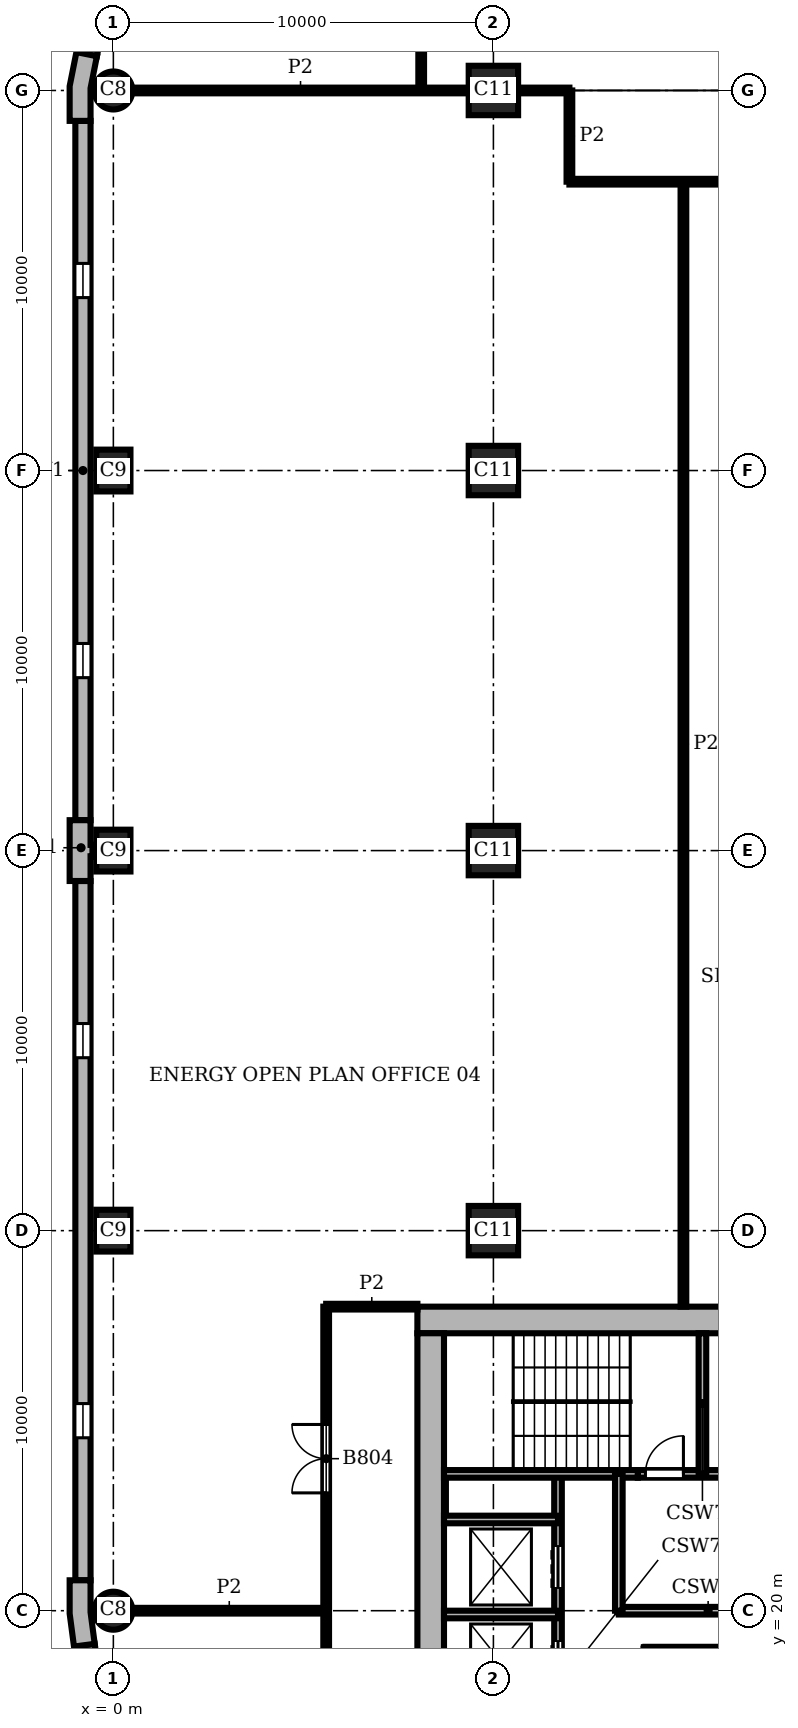
"""IFC4 building model, lengths in metres.
Left out: names, types, materials, properties, quantities, classifications, styles, units other than length and angle.
Written with IfcOpenShell. Run it as: python <this file> out.ifc"""

import sys

from ifc_helpers import new_model, si_unit, direction, frame, frame_2d, origin, origin_2d, place, context, subcontext, project, spatial, polyline, rectangle, circle, outline, extrude, element, fill, save


model = new_model("IFC4")
c1 = context("Model", 3, precision=1e-05, world=origin(), true_north=direction((0.0, 1.0)))
c2 = subcontext(c1, "Body", "Model", "MODEL_VIEW")
j1 = project(units=[si_unit("LENGTHUNIT", "METRE"), si_unit("PLANEANGLEUNIT", "RADIAN")], contexts=[c1])
p1 = place(None, origin())
s1 = spatial("IfcSite", under=j1, at=p1, CompositionType="ELEMENT")
p2 = place(p1, origin())
s2 = spatial("IfcBuilding", under=s1, at=p2, CompositionType="ELEMENT")
p3 = place(p2, frame((0.0, 0.0, 213.6)))
s3 = spatial("IfcBuildingStorey", under=s2, at=p3, CompositionType="ELEMENT", Elevation=213.6)
p4 = place(p3, frame((0.0, 60.0, 0.0), z_axis=(0.0, 0.0, 1.0), x_axis=(1.0, 0.0, 0.0)))
e1 = element("IfcColumn", 1, at=p4, inside=s3, PredefinedType="COLUMN", context=c2, shape_type="SweptSolid", body=[
    extrude(circle(Radius=0.5, at=origin_2d()), origin(), (0.0, 0.0, 1.0), 3.9),
])
for number, where, z_axis, x_axis in (
    (2, (0.0, 50.0, 0.0), (0.0, 0.0, 1.0), (0.0, 1.0, 0.0)),
    (3, (0.0, 40.0, 0.0), (0.0, 0.0, 1.0), (0.0, 1.0, 0.0)),
    (4, (0.0, 30.0, 0.0), (0.0, 0.0, 1.0), (0.0, 1.0, 0.0)),
):
    element("IfcColumn", number, at=place(p3, frame(where, z_axis=z_axis, x_axis=x_axis)), inside=s3, PredefinedType="COLUMN", context=c2, shape_type="SweptSolid", body=[
        extrude(rectangle(XDim=1.1, YDim=0.9, at=origin_2d()), origin(), (0.0, 0.0, 1.0), 3.9),
    ])
p5 = place(p3, frame((0.0, 20.0, 0.0), z_axis=(0.0, 0.0, 1.0), x_axis=(1.0, 0.0, 0.0)))
e5 = element("IfcColumn", 5, at=p5, inside=s3, PredefinedType="COLUMN", context=c2, shape_type="SweptSolid", body=[
    extrude(circle(Radius=0.5, at=origin_2d()), origin(), (0.0, 0.0, 1.0), 3.9),
])
for number, where, z_axis, x_axis in (
    (6, (10.0, 30.0, 0.0), (0.0, 0.0, 1.0), (1.0, 0.0, 0.0)),
    (7, (10.0, 40.0, 0.0), (0.0, 0.0, 1.0), (1.0, 0.0, 0.0)),
    (8, (10.0, 50.0, 0.0), (0.0, 0.0, 1.0), (1.0, 0.0, 0.0)),
    (9, (10.0, 60.0, 0.0), (0.0, 0.0, 1.0), (1.0, 0.0, 0.0)),
):
    element("IfcColumn", number, at=place(p3, frame(where, z_axis=z_axis, x_axis=x_axis)), inside=s3, PredefinedType="COLUMN", context=c2, shape_type="SweptSolid", body=[
        extrude(rectangle(XDim=1.3, YDim=1.3, at=origin_2d()), origin(), (0.0, 0.0, 1.0), 3.9),
    ])
p6 = place(p3, frame((28.0, 27.65, 0.0), z_axis=(0.0, 0.0, 1.0), x_axis=(-1.0, 0.0, 0.0)))
e10 = element("IfcWall", 10, at=p6, inside=s3, PredefinedType="SHEAR", context=c2, shape_type="SweptSolid", body=[
    extrude(rectangle(XDim=20.0, YDim=0.7, at=frame_2d((10.0, 0.0))), origin(), (0.0, 0.0, 1.0), 3.9),
])
p7 = place(p3, frame((8.35, 27.3, 0.0), z_axis=(0.0, 0.0, 1.0), x_axis=(0.0, -1.0, 0.0)))
e11 = element("IfcWall", 11, at=p7, inside=s3, PredefinedType="SHEAR", context=c2, shape_type="SweptSolid", body=[
    extrude(rectangle(XDim=18.6, YDim=0.7, at=frame_2d((9.3, 0.0))), origin(), (0.0, 0.0, 1.0), 3.9),
])
p8 = place(p3, origin())
e12 = element("IfcWall", 12, at=p8, inside=s3, PredefinedType="SOLIDWALL", context=c2, shape_type="SweptSolid", body=[
    extrude(outline(polyline([(-0.825, 60.98), (-0.972, 61.009), (-1.15, 60.113), (-1.15, 59.2), (-1.0, 59.2), (-0.6, 59.2), (-0.6, 60.059), (-0.432, 60.902), (-0.825, 60.98)])), origin(), (0.0, 0.0, 1.0), 3.9),
])
e13 = element("IfcWall", 13, at=p8, inside=s3, PredefinedType="SOLIDWALL", context=c2, shape_type="SweptSolid", body=[
    extrude(outline(polyline([(-0.6, 39.2), (-0.6, 39.85), (-0.55, 39.85), (-0.55, 40.15), (-0.6, 40.15), (-0.6, 40.8), (-1.0, 40.8), (-1.15, 40.8), (-1.15, 40.0), (-1.15, 39.2), (-1.0, 39.2), (-0.6, 39.2)])), origin(), (0.0, 0.0, 1.0), 3.9),
])
e14 = element("IfcWall", 14, at=p8, inside=s3, PredefinedType="SOLIDWALL", context=c2, shape_type="SweptSolid", body=[
    extrude(outline(polyline([(-1.0, 20.8), (-1.15, 20.8), (-1.15, 19.925), (-1.036, 19.057), (-0.887, 19.076), (-0.49, 19.128), (-0.6, 19.961), (-0.6, 20.8), (-1.0, 20.8)])), origin(), (0.0, 0.0, 1.0), 3.9),
])
p9 = place(p3, frame((0.299, 65.602, 0.0), z_axis=(0.0, 0.0, 1.0), x_axis=(-0.195098533057, -0.98078364709, 0.0)))
e15 = element("IfcWall", 15, at=p9, inside=s3, PredefinedType="SOLIDWALL", context=c2, shape_type="SweptSolid", body=[
    extrude(rectangle(XDim=4.753, YDim=0.4, at=frame_2d((2.376, 0.0))), origin(), (0.0, 0.0, 1.0), 3.9),
])
p10 = place(p9, frame((0.226, 0.0, 0.9)))
e16 = element("IfcOpeningElement", 16, at=p10, cuts=e15, PredefinedType="OPENING", context=c2, shape_type="SweptSolid", body=[
    extrude(rectangle(XDim=4.3, YDim=2.35, at=frame_2d((2.15, 1.175))), frame((0.0, 0.21, 0.0), z_axis=(0.0, -1.0, 0.0), x_axis=(1.0, 0.0, 0.0)), (0.0, 0.0, 1.0), 0.42),
])
p11 = place(p3, frame((-0.8, 59.2, 0.0), z_axis=(0.0, 0.0, 1.0), x_axis=(0.0, -1.0, 0.0)))
e17 = element("IfcWall", 17, at=p11, inside=s3, PredefinedType="SOLIDWALL", context=c2, shape_type="SweptSolid", body=[
    extrude(rectangle(XDim=18.4, YDim=0.4, at=frame_2d((9.2, 0.0))), origin(), (0.0, 0.0, 1.0), 3.9),
])
p12 = place(p11, frame((3.75, 0.0, 0.9)))
e18 = element("IfcOpeningElement", 18, at=p12, cuts=e17, PredefinedType="OPENING", context=c2, shape_type="SweptSolid", body=[
    extrude(rectangle(XDim=0.9, YDim=2.35, at=frame_2d((0.45, 1.175))), frame((0.0, 0.21, 0.0), z_axis=(0.0, -1.0, 0.0), x_axis=(1.0, 0.0, 0.0)), (0.0, 0.0, 1.0), 0.42),
])
p13 = place(p11, frame((13.75, 0.0, 0.9)))
e19 = element("IfcOpeningElement", 19, at=p13, cuts=e17, PredefinedType="OPENING", context=c2, shape_type="SweptSolid", body=[
    extrude(rectangle(XDim=0.9, YDim=2.35, at=frame_2d((0.45, 1.175))), frame((0.0, 0.21, 0.0), z_axis=(0.0, -1.0, 0.0), x_axis=(1.0, 0.0, 0.0)), (0.0, 0.0, 1.0), 0.42),
])
p14 = place(p3, frame((-0.8, 39.2, 0.0), z_axis=(0.0, 0.0, 1.0), x_axis=(0.0, -1.0, 0.0)))
e20 = element("IfcWall", 20, at=p14, inside=s3, PredefinedType="SOLIDWALL", context=c2, shape_type="SweptSolid", body=[
    extrude(rectangle(XDim=18.4, YDim=0.4, at=frame_2d((9.2, 0.0))), origin(), (0.0, 0.0, 1.0), 3.9),
])
p15 = place(p14, frame((3.75, 0.0, 0.9)))
e21 = element("IfcOpeningElement", 21, at=p15, cuts=e20, PredefinedType="OPENING", context=c2, shape_type="SweptSolid", body=[
    extrude(rectangle(XDim=0.9, YDim=2.35, at=frame_2d((0.45, 1.175))), frame((0.0, 0.21, 0.0), z_axis=(0.0, -1.0, 0.0), x_axis=(1.0, 0.0, 0.0)), (0.0, 0.0, 1.0), 0.42),
])
p16 = place(p14, frame((13.75, 0.0, 0.9)))
e22 = element("IfcOpeningElement", 22, at=p16, cuts=e20, PredefinedType="OPENING", context=c2, shape_type="SweptSolid", body=[
    extrude(rectangle(XDim=0.9, YDim=2.35, at=frame_2d((0.45, 1.175))), frame((0.0, 0.21, 0.0), z_axis=(0.0, -1.0, 0.0), x_axis=(1.0, 0.0, 0.0)), (0.0, 0.0, 1.0), 0.42),
])
p17 = place(p3, frame((-0.689, 19.102, 0.0), z_axis=(0.0, 0.0, 1.0), x_axis=(0.130514280502, -0.991446429508, 0.0)))
e23 = element("IfcWall", 23, at=p17, inside=s3, PredefinedType="SOLIDWALL", context=c2, shape_type="SweptSolid", body=[
    extrude(rectangle(XDim=4.121, YDim=0.4, at=frame_2d((2.061, 0.0))), origin(), (0.0, 0.0, 1.0), 3.9),
])
p18 = place(p17, frame((1.611, 0.0, 0.9)))
e24 = element("IfcOpeningElement", 24, at=p18, cuts=e23, PredefinedType="OPENING", context=c2, shape_type="SweptSolid", body=[
    extrude(rectangle(XDim=0.9, YDim=2.35, at=frame_2d((0.45, 1.175))), frame((0.0, 0.21, 0.0), z_axis=(0.0, -1.0, 0.0), x_axis=(1.0, 0.0, 0.0)), (0.0, 0.0, 1.0), 0.42),
])
p19 = place(p3, frame((14.0, 19.0, 0.0), z_axis=(0.0, 0.0, 1.0), x_axis=(1.0, 0.0, 0.0)))
e25 = element("IfcWall", 25, at=p19, inside=s3, PredefinedType="PARTITIONING", context=c2, shape_type="SweptSolid", body=[
    extrude(rectangle(XDim=8.0, YDim=0.1, at=frame_2d((4.0, 0.0))), origin(), (0.0, 0.0, 1.0), 3.58),
])
p20 = place(p19, frame((5.45, 0.0, 0.0)))
e26 = element("IfcOpeningElement", 26, at=p20, cuts=e25, PredefinedType="OPENING", context=c2, shape_type="SweptSolid", body=[
    extrude(rectangle(XDim=1.1, YDim=2.1, at=frame_2d((0.55, 1.05))), frame((0.0, 0.06, 0.0), z_axis=(0.0, -1.0, 0.0), x_axis=(1.0, 0.0, 0.0)), (0.0, 0.0, 1.0), 0.12),
])
p21 = place(p3, frame((8.7, 19.9, 0.0), z_axis=(0.0, 0.0, 1.0), x_axis=(1.0, 0.0, 0.0)))
e27 = element("IfcWall", 27, at=p21, inside=s3, PredefinedType="SHEAR", context=c2, shape_type="SweptSolid", body=[
    extrude(rectangle(XDim=3.0, YDim=0.2, at=frame_2d((1.5, 0.0))), origin(), (0.0, 0.0, 1.0), 3.58),
])
p22 = place(p3, frame((13.3, 20.0, 0.0), z_axis=(0.0, 0.0, 1.0), x_axis=(1.0, 0.0, 0.0)))
e28 = element("IfcWall", 28, at=p22, inside=s3, PredefinedType="SHEAR", context=c2, shape_type="SweptSolid", body=[
    extrude(rectangle(XDim=4.7, YDim=0.2, at=frame_2d((2.35, 0.0))), origin(), (0.0, 0.0, 1.0), 3.58),
])
p23 = place(p3, frame((8.7, 22.4, 0.0), z_axis=(0.0, 0.0, 1.0), x_axis=(1.0, 0.0, 0.0)))
e29 = element("IfcWall", 29, at=p23, inside=s3, PredefinedType="SHEAR", context=c2, shape_type="SweptSolid", body=[
    extrude(rectangle(XDim=3.0, YDim=0.2, at=frame_2d((1.5, 0.0))), origin(), (0.0, 0.0, 1.0), 3.58),
])
p24 = place(p3, frame((8.7, 23.6, 0.0), z_axis=(0.0, 0.0, 1.0), x_axis=(1.0, 0.0, 0.0)))
e30 = element("IfcWall", 30, at=p24, inside=s3, PredefinedType="SHEAR", context=c2, shape_type="SweptSolid", body=[
    extrude(rectangle(XDim=5.1, YDim=0.2, at=frame_2d((2.55, 0.0))), origin(), (0.0, 0.0, 1.0), 3.58),
])
p25 = place(p3, frame((13.8, 23.6, 0.0), z_axis=(0.0, 0.0, 1.0), x_axis=(1.0, 0.0, 0.0)))
e31 = element("IfcWall", 31, at=p25, inside=s3, PredefinedType="SHEAR", context=c2, shape_type="SweptSolid", body=[
    extrude(rectangle(XDim=13.5, YDim=0.2, at=frame_2d((6.75, 0.0))), origin(), (0.0, 0.0, 1.0), 3.58),
])
p26 = place(p25, frame((2.4, 0.0, 0.0)))
e32 = element("IfcOpeningElement", 32, at=p26, cuts=e31, PredefinedType="OPENING", context=c2, shape_type="SweptSolid", body=[
    extrude(rectangle(XDim=1.1, YDim=2.1, at=frame_2d((0.55, 1.05))), frame((0.0, 0.11, 0.0), z_axis=(0.0, -1.0, 0.0), x_axis=(1.0, 0.0, 0.0)), (0.0, 0.0, 1.0), 0.22),
])
p27 = place(p25, frame((4.9, 0.0, 0.0)))
e33 = element("IfcOpeningElement", 33, at=p27, cuts=e31, PredefinedType="OPENING", context=c2, shape_type="SweptSolid", body=[
    extrude(rectangle(XDim=1.1, YDim=2.1, at=frame_2d((0.55, 1.05))), frame((0.0, 0.11, 0.0), z_axis=(0.0, -1.0, 0.0), x_axis=(1.0, 0.0, 0.0)), (0.0, 0.0, 1.0), 0.22),
])
p28 = place(p25, frame((0.2, 0.0, 0.0)))
e34 = element("IfcOpeningElement", 34, at=p28, cuts=e31, PredefinedType="OPENING", context=c2, shape_type="SweptSolid", body=[
    extrude(rectangle(XDim=1.0, YDim=2.1, at=frame_2d((0.5, 1.05))), frame((0.0, 0.11, 0.0), z_axis=(0.0, -1.0, 0.0), x_axis=(1.0, 0.0, 0.0)), (0.0, 0.0, 1.0), 0.22),
])
p29 = place(p3, frame((11.7, 12.4, 0.0), z_axis=(0.0, 0.0, 1.0), x_axis=(0.0, 1.0, 0.0)))
e35 = element("IfcWall", 35, at=p29, inside=s3, PredefinedType="SHEAR", context=c2, shape_type="SweptSolid", body=[
    extrude(rectangle(XDim=11.2, YDim=0.2, at=frame_2d((5.6, 0.0))), origin(), (0.0, 0.0, 1.0), 3.58),
])
p30 = place(p29, frame((0.7, 0.0, 0.0)))
e36 = element("IfcOpeningElement", 36, at=p30, cuts=e35, PredefinedType="OPENING", context=c2, shape_type="SweptSolid", body=[
    extrude(rectangle(XDim=1.1, YDim=2.1, at=frame_2d((0.55, 1.05))), frame((0.0, 0.11, 0.0), z_axis=(0.0, -1.0, 0.0), x_axis=(1.0, 0.0, 0.0)), (0.0, 0.0, 1.0), 0.22),
])
p31 = place(p29, frame((3.2, 0.0, 0.0)))
e37 = element("IfcOpeningElement", 37, at=p31, cuts=e35, PredefinedType="OPENING", context=c2, shape_type="SweptSolid", body=[
    extrude(rectangle(XDim=1.1, YDim=2.1, at=frame_2d((0.55, 1.05))), frame((0.0, 0.11, 0.0), z_axis=(0.0, -1.0, 0.0), x_axis=(1.0, 0.0, 0.0)), (0.0, 0.0, 1.0), 0.22),
])
p32 = place(p29, frame((5.7, 0.0, 0.0)))
e38 = element("IfcOpeningElement", 38, at=p32, cuts=e35, PredefinedType="OPENING", context=c2, shape_type="SweptSolid", body=[
    extrude(rectangle(XDim=1.1, YDim=2.1, at=frame_2d((0.55, 1.05))), frame((0.0, 0.11, 0.0), z_axis=(0.0, -1.0, 0.0), x_axis=(1.0, 0.0, 0.0)), (0.0, 0.0, 1.0), 0.22),
])
p33 = place(p29, frame((8.2, 0.0, 0.0)))
e39 = element("IfcOpeningElement", 39, at=p33, cuts=e35, PredefinedType="OPENING", context=c2, shape_type="SweptSolid", body=[
    extrude(rectangle(XDim=1.1, YDim=2.1, at=frame_2d((0.55, 1.05))), frame((0.0, 0.11, 0.0), z_axis=(0.0, -1.0, 0.0), x_axis=(1.0, 0.0, 0.0)), (0.0, 0.0, 1.0), 0.22),
])
p34 = place(p3, frame((13.3, 20.0, 0.0), z_axis=(0.0, 0.0, 1.0), x_axis=(0.0, 1.0, 0.0)))
e40 = element("IfcWall", 40, at=p34, inside=s3, PredefinedType="SHEAR", context=c2, shape_type="SweptSolid", body=[
    extrude(rectangle(XDim=3.6, YDim=0.2, at=frame_2d((1.8, 0.0))), origin(), (0.0, 0.0, 1.0), 3.58),
])
p35 = place(p3, frame((15.5, 23.6, 0.0), z_axis=(0.0, 0.0, 1.0), x_axis=(0.0, 1.0, 0.0)))
e41 = element("IfcWall", 41, at=p35, inside=s3, PredefinedType="SHEAR", context=c2, shape_type="SweptSolid", body=[
    extrude(rectangle(XDim=3.7, YDim=0.2, at=frame_2d((1.85, 0.0))), origin(), (0.0, 0.0, 1.0), 3.58),
])
p36 = place(p3, frame((5.6, 5.6, 0.0), z_axis=(0.0, 0.0, 1.0), x_axis=(0.0, 1.0, 0.0)))
e42 = element("IfcWall", 42, at=p36, inside=s3, PredefinedType="PARTITIONING", context=c2, shape_type="SweptSolid", body=[
    extrude(rectangle(XDim=22.4, YDim=0.15, at=frame_2d((11.2, 0.0))), origin(), (0.0, 0.0, 1.0), 3.58),
])
p37 = place(p36, frame((5.35, 0.0, 0.0)))
e43 = element("IfcOpeningElement", 43, at=p37, cuts=e42, PredefinedType="OPENING", context=c2, shape_type="SweptSolid", body=[
    extrude(rectangle(XDim=1.0, YDim=2.1, at=frame_2d((0.5, 1.05))), frame((0.0, 0.085, 0.0), z_axis=(0.0, -1.0, 0.0), x_axis=(1.0, 0.0, 0.0)), (0.0, 0.0, 1.0), 0.17),
])
p38 = place(p36, frame((11.5, 0.0, 0.0)))
e44 = element("IfcOpeningElement", 44, at=p38, cuts=e42, PredefinedType="OPENING", context=c2, shape_type="SweptSolid", body=[
    extrude(rectangle(XDim=0.8, YDim=2.1, at=frame_2d((0.4, 1.05))), frame((0.0, 0.085, 0.0), z_axis=(0.0, -1.0, 0.0), x_axis=(1.0, 0.0, 0.0)), (0.0, 0.0, 1.0), 0.17),
])
p39 = place(p36, frame((17.5, 0.0, 0.0)))
e45 = element("IfcOpeningElement", 45, at=p39, cuts=e42, PredefinedType="OPENING", context=c2, shape_type="SweptSolid", body=[
    extrude(rectangle(XDim=1.8, YDim=2.1, at=frame_2d((0.9, 1.05))), frame((0.0, 0.085, 0.0), z_axis=(0.0, -1.0, 0.0), x_axis=(1.0, 0.0, 0.0)), (0.0, 0.0, 1.0), 0.17),
])
p40 = place(p3, frame((8.1, 60.0, 0.0), z_axis=(0.0, 0.0, 1.0), x_axis=(0.0, 1.0, 0.0)))
e46 = element("IfcWall", 46, at=p40, inside=s3, PredefinedType="PARTITIONING", context=c2, shape_type="SweptSolid", body=[
    extrude(rectangle(XDim=6.4, YDim=0.15, at=frame_2d((3.2, 0.0))), origin(), (0.0, 0.0, 1.0), 3.58),
])
p41 = place(p40, frame((2.6, 0.0, 0.0)))
e47 = element("IfcOpeningElement", 47, at=p41, cuts=e46, PredefinedType="OPENING", context=c2, shape_type="SweptSolid", body=[
    extrude(rectangle(XDim=1.8, YDim=2.1, at=frame_2d((0.9, 1.05))), frame((0.0, 0.085, 0.0), z_axis=(0.0, -1.0, 0.0), x_axis=(1.0, 0.0, 0.0)), (0.0, 0.0, 1.0), 0.17),
])
p42 = place(p3, frame((12.0, 57.6, 0.0), z_axis=(0.0, 0.0, 1.0), x_axis=(0.0, 1.0, 0.0)))
e48 = element("IfcWall", 48, at=p42, inside=s3, PredefinedType="PARTITIONING", context=c2, shape_type="SweptSolid", body=[
    extrude(rectangle(XDim=2.4, YDim=0.15, at=frame_2d((1.2, 0.0))), origin(), (0.0, 0.0, 1.0), 3.58),
])
p43 = place(p3, frame((15.0, 28.0, 0.0), z_axis=(0.0, 0.0, 1.0), x_axis=(0.0, 1.0, 0.0)))
e49 = element("IfcWall", 49, at=p43, inside=s3, PredefinedType="PARTITIONING", context=c2, shape_type="SweptSolid", body=[
    extrude(rectangle(XDim=29.6, YDim=0.15, at=frame_2d((14.8, 0.0))), origin(), (0.0, 0.0, 1.0), 3.58),
])
p44 = place(p3, frame((0.5, 20.0, 0.0), z_axis=(0.0, 0.0, 1.0), x_axis=(1.0, 0.0, 0.0)))
e50 = element("IfcWall", 50, at=p44, inside=s3, PredefinedType="PARTITIONING", context=c2, shape_type="SweptSolid", body=[
    extrude(rectangle(XDim=5.1, YDim=0.15, at=frame_2d((2.55, 0.0))), origin(), (0.0, 0.0, 1.0), 3.58),
])
p45 = place(p3, frame((5.6, 28.0, 0.0), z_axis=(0.0, 0.0, 1.0), x_axis=(1.0, 0.0, 0.0)))
e51 = element("IfcWall", 51, at=p45, inside=s3, PredefinedType="PARTITIONING", context=c2, shape_type="SweptSolid", body=[
    extrude(rectangle(XDim=2.4, YDim=0.15, at=frame_2d((1.2, 0.0))), origin(), (0.0, 0.0, 1.0), 3.58),
])
p46 = place(p3, frame((12.0, 57.6, 0.0), z_axis=(0.0, 0.0, 1.0), x_axis=(1.0, 0.0, 0.0)))
e52 = element("IfcWall", 52, at=p46, inside=s3, PredefinedType="PARTITIONING", context=c2, shape_type="SweptSolid", body=[
    extrude(rectangle(XDim=14.0, YDim=0.15, at=frame_2d((7.0, 0.0))), origin(), (0.0, 0.0, 1.0), 3.58),
])
p47 = place(p3, frame((0.5, 60.0, 0.0), z_axis=(0.0, 0.0, 1.0), x_axis=(1.0, 0.0, 0.0)))
e53 = element("IfcWall", 53, at=p47, inside=s3, PredefinedType="PARTITIONING", context=c2, shape_type="SweptSolid", body=[
    extrude(rectangle(XDim=8.85, YDim=0.15, at=frame_2d((4.425, 0.0))), origin(), (0.0, 0.0, 1.0), 3.58),
])
p48 = place(p3, frame((10.65, 60.0, 0.0), z_axis=(0.0, 0.0, 1.0), x_axis=(1.0, 0.0, 0.0)))
e54 = element("IfcWall", 54, at=p48, inside=s3, PredefinedType="PARTITIONING", context=c2, shape_type="SweptSolid", body=[
    extrude(rectangle(XDim=1.35, YDim=0.15, at=frame_2d((0.675, 0.0))), origin(), (0.0, 0.0, 1.0), 3.58),
])
p49 = place(p12, origin())
e55 = element("IfcWindow", 55, at=p49, inside=s3, PartitioningType="SINGLE_PANEL", PredefinedType="WINDOW", context=c2, shape_type="SweptSolid", body=[
    extrude(rectangle(XDim=0.9, YDim=2.35, at=frame_2d((0.45, 1.175))), frame((0.0, 0.16, 0.0), z_axis=(0.0, -1.0, 0.0), x_axis=(1.0, 0.0, 0.0)), (0.0, 0.0, 1.0), 0.06),
])
fill(e18, e55)
p50 = place(p13, origin())
e56 = element("IfcWindow", 56, at=p50, inside=s3, PartitioningType="SINGLE_PANEL", PredefinedType="WINDOW", context=c2, shape_type="SweptSolid", body=[
    extrude(rectangle(XDim=0.9, YDim=2.35, at=frame_2d((0.45, 1.175))), frame((0.0, 0.16, 0.0), z_axis=(0.0, -1.0, 0.0), x_axis=(1.0, 0.0, 0.0)), (0.0, 0.0, 1.0), 0.06),
])
fill(e19, e56)
p51 = place(p15, origin())
e57 = element("IfcWindow", 57, at=p51, inside=s3, PartitioningType="SINGLE_PANEL", PredefinedType="WINDOW", context=c2, shape_type="SweptSolid", body=[
    extrude(rectangle(XDim=0.9, YDim=2.35, at=frame_2d((0.45, 1.175))), frame((0.0, 0.16, 0.0), z_axis=(0.0, -1.0, 0.0), x_axis=(1.0, 0.0, 0.0)), (0.0, 0.0, 1.0), 0.06),
])
fill(e21, e57)
p52 = place(p16, origin())
e58 = element("IfcWindow", 58, at=p52, inside=s3, PartitioningType="SINGLE_PANEL", PredefinedType="WINDOW", context=c2, shape_type="SweptSolid", body=[
    extrude(rectangle(XDim=0.9, YDim=2.35, at=frame_2d((0.45, 1.175))), frame((0.0, 0.16, 0.0), z_axis=(0.0, -1.0, 0.0), x_axis=(1.0, 0.0, 0.0)), (0.0, 0.0, 1.0), 0.06),
])
fill(e22, e58)
p53 = place(p32, origin())
e59 = element("IfcDoor", 59, at=p53, inside=s3, OperationType="DOUBLE_DOOR_SLIDING", PredefinedType="DOOR", context=c2, shape_type="SweptSolid", body=[
    extrude(rectangle(XDim=1.1, YDim=2.1, at=frame_2d((0.55, 1.05))), frame((0.0, 0.025, 0.0), z_axis=(0.0, -1.0, 0.0), x_axis=(1.0, 0.0, 0.0)), (0.0, 0.0, 1.0), 0.05),
])
fill(e38, e59)
p54 = place(p33, origin())
e60 = element("IfcDoor", 60, at=p54, inside=s3, OperationType="DOUBLE_DOOR_SLIDING", PredefinedType="DOOR", context=c2, shape_type="SweptSolid", body=[
    extrude(rectangle(XDim=1.1, YDim=2.1, at=frame_2d((0.55, 1.05))), frame((0.0, 0.025, 0.0), z_axis=(0.0, -1.0, 0.0), x_axis=(1.0, 0.0, 0.0)), (0.0, 0.0, 1.0), 0.05),
])
fill(e39, e60)
p55 = place(p28, origin())
e61 = element("IfcDoor", 61, at=p55, inside=s3, OperationType="SINGLE_SWING_RIGHT", PredefinedType="DOOR", context=c2, shape_type="SweptSolid", body=[
    extrude(rectangle(XDim=1.0, YDim=2.1, at=frame_2d((0.5, 1.05))), frame((0.0, 0.025, 0.0), z_axis=(0.0, -1.0, 0.0), x_axis=(1.0, 0.0, 0.0)), (0.0, 0.0, 1.0), 0.05),
])
fill(e34, e61)
p56 = place(p39, origin())
e62 = element("IfcDoor", 62, at=p56, inside=s3, OperationType="DOUBLE_DOOR_SINGLE_SWING", PredefinedType="DOOR", context=c2, shape_type="SweptSolid", body=[
    extrude(rectangle(XDim=1.8, YDim=2.1, at=frame_2d((0.9, 1.05))), frame((0.0, 0.025, 0.0), z_axis=(0.0, -1.0, 0.0), x_axis=(1.0, 0.0, 0.0)), (0.0, 0.0, 1.0), 0.05),
])
fill(e45, e62)
save(model, sys.argv[1])
